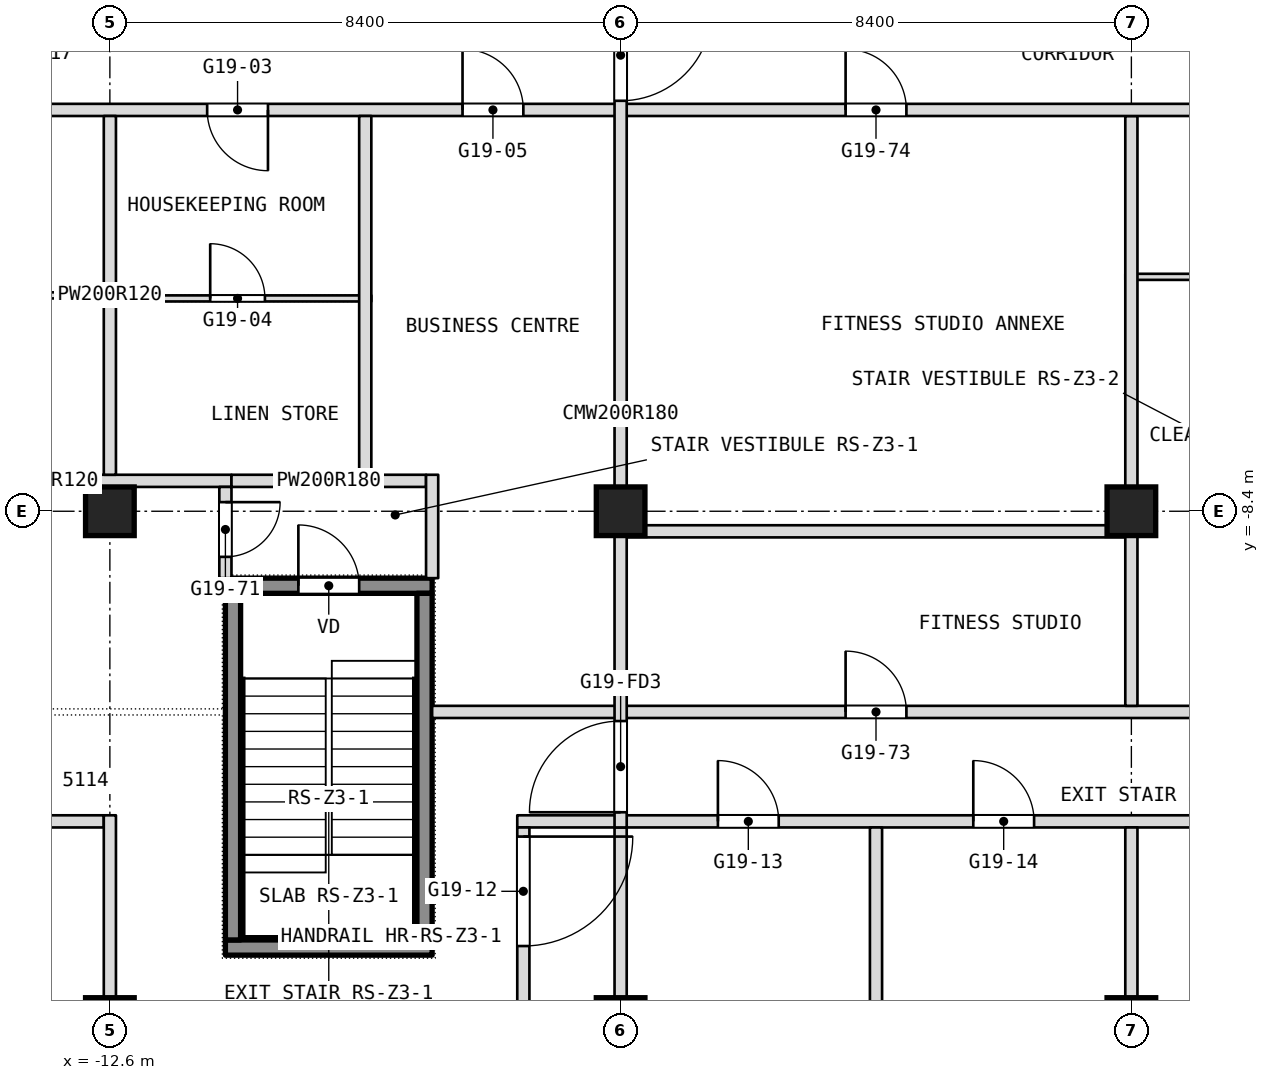
"""IFC4 building model, lengths in metres.
Left out: names, types, materials, properties, quantities, classifications, styles, units other than length and angle.
Written with IfcOpenShell. Run it as: python <this file> out.ifc"""

import sys

from ifc_helpers import new_model, si_unit, direction, frame, frame_2d, origin, origin_2d, place, context, subcontext, project, spatial, rectangle, extrude, element, fill, save


model = new_model("IFC4")
c1 = context("Model", 3, precision=1e-05, world=origin(), true_north=direction((0.0, 1.0)))
c2 = subcontext(c1, "Body", "Model", "MODEL_VIEW")
j1 = project(units=[si_unit("LENGTHUNIT", "METRE"), si_unit("PLANEANGLEUNIT", "RADIAN")], contexts=[c1])
p1 = place(None, origin())
s1 = spatial("IfcSite", under=j1, at=p1, CompositionType="ELEMENT")
p2 = place(p1, origin())
s2 = spatial("IfcBuilding", under=s1, at=p2, CompositionType="ELEMENT")
p3 = place(p2, frame((0.0, 0.0, 220.1)))
s3 = spatial("IfcBuildingStorey", under=s2, at=p3, CompositionType="ELEMENT", Elevation=220.1)
for number, where, z_axis, x_axis in (
    (1, (-12.6, -16.8, 0.0), (0.0, 0.0, 1.0), (1.0, 0.0, 0.0)),
    (2, (-12.6, -8.4, 0.0), (0.0, 0.0, 1.0), (1.0, 0.0, 0.0)),
    (3, (-4.2, -16.8, 0.0), (0.0, 0.0, 1.0), (1.0, 0.0, 0.0)),
    (4, (-4.2, -8.4, 0.0), (0.0, 0.0, 1.0), (1.0, 0.0, 0.0)),
    (5, (4.2, -16.8, 0.0), (0.0, 0.0, 1.0), (1.0, 0.0, 0.0)),
    (6, (4.2, -8.4, 0.0), (0.0, 0.0, 1.0), (1.0, 0.0, 0.0)),
):
    element("IfcColumn", number, at=place(p3, frame(where, z_axis=z_axis, x_axis=x_axis)), inside=s3, PredefinedType="COLUMN", context=c2, shape_type="SweptSolid", body=[
        extrude(rectangle(XDim=0.8, YDim=0.8, at=origin_2d()), origin(), (0.0, 0.0, 1.0), 3.6),
    ])
p4 = place(p3, frame((-16.7, -13.5, 0.0), z_axis=(0.0, 0.0, 1.0), x_axis=(1.0, 0.0, 0.0)))
e7 = element("IfcWall", 7, at=p4, inside=s3, PredefinedType="PARTITIONING", context=c2, shape_type="SweptSolid", body=[
    extrude(rectangle(XDim=4.0, YDim=0.2, at=frame_2d((2.0, 0.0))), origin(), (0.0, 0.0, 1.0), 3.34),
])
p5 = place(p4, frame((1.5, 0.0, 0.0)))
e8 = element("IfcOpeningElement", 8, at=p5, cuts=e7, PredefinedType="OPENING", context=c2, shape_type="SweptSolid", body=[
    extrude(rectangle(XDim=1.0, YDim=2.1, at=frame_2d((0.5, 1.05))), frame((0.0, 0.1, 0.0), z_axis=(0.0, -1.0, 0.0), x_axis=(1.0, 0.0, 0.0)), (0.0, 0.0, 1.0), 0.2),
])
p6 = place(p3, frame((-5.9, -13.5, 0.0), z_axis=(0.0, 0.0, 1.0), x_axis=(1.0, 0.0, 0.0)))
e9 = element("IfcWall", 9, at=p6, inside=s3, PredefinedType="PARTITIONING", context=c2, shape_type="SweptSolid", body=[
    extrude(rectangle(XDim=11.6, YDim=0.2, at=frame_2d((5.8, 0.0))), origin(), (0.0, 0.0, 1.0), 3.34),
])
p7 = place(p6, frame((3.3, 0.0, 0.0)))
e10 = element("IfcOpeningElement", 10, at=p7, cuts=e9, PredefinedType="OPENING", context=c2, shape_type="SweptSolid", body=[
    extrude(rectangle(XDim=1.0, YDim=2.1, at=frame_2d((0.5, 1.05))), frame((0.0, 0.1, 0.0), z_axis=(0.0, -1.0, 0.0), x_axis=(1.0, 0.0, 0.0)), (0.0, 0.0, 1.0), 0.2),
])
p8 = place(p6, frame((7.5, 0.0, 0.0)))
e11 = element("IfcOpeningElement", 11, at=p8, cuts=e9, PredefinedType="OPENING", context=c2, shape_type="SweptSolid", body=[
    extrude(rectangle(XDim=1.0, YDim=2.1, at=frame_2d((0.5, 1.05))), frame((0.0, 0.1, 0.0), z_axis=(0.0, -1.0, 0.0), x_axis=(1.0, 0.0, 0.0)), (0.0, 0.0, 1.0), 0.2),
])
p9 = place(p3, frame((-7.3, -11.7, 0.0), z_axis=(0.0, 0.0, 1.0), x_axis=(1.0, 0.0, 0.0)))
e12 = element("IfcWall", 12, at=p9, inside=s3, PredefinedType="PARTITIONING", context=c2, shape_type="SweptSolid", body=[
    extrude(rectangle(XDim=14.6, YDim=0.2, at=frame_2d((7.3, 0.0))), origin(), (0.0, 0.0, 1.0), 3.34),
])
p10 = place(p9, frame((6.8, 0.0, 0.0)))
e13 = element("IfcOpeningElement", 13, at=p10, cuts=e12, PredefinedType="OPENING", context=c2, shape_type="SweptSolid", body=[
    extrude(rectangle(XDim=1.0, YDim=2.1, at=frame_2d((0.5, 1.05))), frame((0.0, 0.1, 0.0), z_axis=(0.0, -1.0, 0.0), x_axis=(1.0, 0.0, 0.0)), (0.0, 0.0, 1.0), 0.2),
])
p11 = place(p3, frame((-4.1, -8.73, 0.0), z_axis=(0.0, 0.0, 1.0), x_axis=(1.0, 0.0, 0.0)))
e14 = element("IfcWall", 14, at=p11, inside=s3, PredefinedType="PARTITIONING", context=c2, shape_type="SweptSolid", body=[
    extrude(rectangle(XDim=8.2, YDim=0.2, at=frame_2d((4.1, 0.0))), origin(), (0.0, 0.0, 1.0), 3.34),
])
p12 = place(p3, frame((-16.7, -7.9, 0.0), z_axis=(0.0, 0.0, 1.0), x_axis=(1.0, 0.0, 0.0)))
e15 = element("IfcWall", 15, at=p12, inside=s3, PredefinedType="PARTITIONING", context=c2, shape_type="SweptSolid", body=[
    extrude(rectangle(XDim=6.1, YDim=0.2, at=frame_2d((3.05, 0.0))), origin(), (0.0, 0.0, 1.0), 3.34),
])
p13 = place(p3, frame((-10.6, -7.9, 0.0), z_axis=(0.0, 0.0, 1.0), x_axis=(1.0, 0.0, 0.0)))
e16 = element("IfcWall", 16, at=p13, inside=s3, PredefinedType="PARTITIONING", context=c2, shape_type="SweptSolid", body=[
    extrude(rectangle(XDim=3.2, YDim=0.2, at=frame_2d((1.6, 0.0))), origin(), (0.0, 0.0, 1.0), 3.34),
])
p14 = place(p3, frame((-12.5, -4.9, 0.0), z_axis=(0.0, 0.0, 1.0), x_axis=(1.0, 0.0, 0.0)))
e17 = element("IfcWall", 17, at=p14, inside=s3, PredefinedType="PARTITIONING", context=c2, shape_type="SweptSolid", body=[
    extrude(rectangle(XDim=4.2, YDim=0.1, at=frame_2d((2.1, 0.0))), origin(), (0.0, 0.0, 1.0), 3.34),
])
p15 = place(p14, frame((1.55, 0.0, 0.0)))
e18 = element("IfcOpeningElement", 18, at=p15, cuts=e17, PredefinedType="OPENING", context=c2, shape_type="SweptSolid", body=[
    extrude(rectangle(XDim=0.9, YDim=2.1, at=frame_2d((0.45, 1.05))), frame((0.0, 0.05, 0.0), z_axis=(0.0, -1.0, 0.0), x_axis=(1.0, 0.0, 0.0)), (0.0, 0.0, 1.0), 0.1),
])
p16 = place(p3, frame((-16.7, -4.85, 0.0), z_axis=(0.0, 0.0, 1.0), x_axis=(1.0, 0.0, 0.0)))
e19 = element("IfcWall", 19, at=p16, inside=s3, PredefinedType="PARTITIONING", context=c2, shape_type="SweptSolid", body=[
    extrude(rectangle(XDim=4.2, YDim=0.1, at=frame_2d((2.1, 0.0))), origin(), (0.0, 0.0, 1.0), 3.34),
])
p17 = place(p16, frame((1.55, 0.0, 0.0)))
e20 = element("IfcOpeningElement", 20, at=p17, cuts=e19, PredefinedType="OPENING", context=c2, shape_type="SweptSolid", body=[
    extrude(rectangle(XDim=0.9, YDim=2.1, at=frame_2d((0.45, 1.05))), frame((0.0, 0.05, 0.0), z_axis=(0.0, -1.0, 0.0), x_axis=(1.0, 0.0, 0.0)), (0.0, 0.0, 1.0), 0.1),
])
p18 = place(p3, frame((4.1, -4.545, 0.0), z_axis=(0.0, 0.0, 1.0), x_axis=(1.0, 0.0, 0.0)))
e21 = element("IfcWall", 21, at=p18, inside=s3, PredefinedType="PARTITIONING", context=c2, shape_type="SweptSolid", body=[
    extrude(rectangle(XDim=4.4, YDim=0.1, at=frame_2d((2.2, 0.0))), origin(), (0.0, 0.0, 1.0), 3.34),
])
p19 = place(p18, frame((1.75, 0.0, 0.0)))
e22 = element("IfcOpeningElement", 22, at=p19, cuts=e21, PredefinedType="OPENING", context=c2, shape_type="SweptSolid", body=[
    extrude(rectangle(XDim=0.9, YDim=2.1, at=frame_2d((0.45, 1.05))), frame((0.0, 0.05, 0.0), z_axis=(0.0, -1.0, 0.0), x_axis=(1.0, 0.0, 0.0)), (0.0, 0.0, 1.0), 0.1),
])
p20 = place(p3, frame((4.2, -20.0, 0.0), z_axis=(0.0, 0.0, 1.0), x_axis=(0.0, 1.0, 0.0)))
e23 = element("IfcWall", 23, at=p20, inside=s3, PredefinedType="PARTITIONING", context=c2, shape_type="SweptSolid", body=[
    extrude(rectangle(XDim=6.4, YDim=0.2, at=frame_2d((3.2, 0.0))), origin(), (0.0, 0.0, 1.0), 3.34),
])
p21 = place(p3, frame((4.2, -11.6, 0.0), z_axis=(0.0, 0.0, 1.0), x_axis=(0.0, 1.0, 0.0)))
e24 = element("IfcWall", 24, at=p21, inside=s3, PredefinedType="PARTITIONING", context=c2, shape_type="SweptSolid", body=[
    extrude(rectangle(XDim=9.7, YDim=0.2, at=frame_2d((4.85, 0.0))), origin(), (0.0, 0.0, 1.0), 3.34),
])
p22 = place(p3, frame((-16.9, -1.8, 0.0), z_axis=(0.0, 0.0, 1.0), x_axis=(1.0, 0.0, 0.0)))
e25 = element("IfcWall", 25, at=p22, inside=s3, PredefinedType="PARTITIONING", context=c2, shape_type="SweptSolid", body=[
    extrude(rectangle(XDim=33.8, YDim=0.2, at=frame_2d((16.9, 0.0))), origin(), (0.0, 0.0, 1.0), 3.34),
])
p23 = place(p22, frame((1.7, 0.0, 0.0)))
e26 = element("IfcOpeningElement", 26, at=p23, cuts=e25, PredefinedType="OPENING", context=c2, shape_type="SweptSolid", body=[
    extrude(rectangle(XDim=1.0, YDim=2.1, at=frame_2d((0.5, 1.05))), frame((0.0, 0.1, 0.0), z_axis=(0.0, -1.0, 0.0), x_axis=(1.0, 0.0, 0.0)), (0.0, 0.0, 1.0), 0.2),
])
p24 = place(p22, frame((5.9, 0.0, 0.0)))
e27 = element("IfcOpeningElement", 27, at=p24, cuts=e25, PredefinedType="OPENING", context=c2, shape_type="SweptSolid", body=[
    extrude(rectangle(XDim=1.0, YDim=2.1, at=frame_2d((0.5, 1.05))), frame((0.0, 0.1, 0.0), z_axis=(0.0, -1.0, 0.0), x_axis=(1.0, 0.0, 0.0)), (0.0, 0.0, 1.0), 0.2),
])
p25 = place(p22, frame((10.1, 0.0, 0.0)))
e28 = element("IfcOpeningElement", 28, at=p25, cuts=e25, PredefinedType="OPENING", context=c2, shape_type="SweptSolid", body=[
    extrude(rectangle(XDim=1.0, YDim=2.1, at=frame_2d((0.5, 1.05))), frame((0.0, 0.1, 0.0), z_axis=(0.0, -1.0, 0.0), x_axis=(1.0, 0.0, 0.0)), (0.0, 0.0, 1.0), 0.2),
])
p26 = place(p22, frame((22.7, 0.0, 0.0)))
e29 = element("IfcOpeningElement", 29, at=p26, cuts=e25, PredefinedType="OPENING", context=c2, shape_type="SweptSolid", body=[
    extrude(rectangle(XDim=1.0, YDim=2.1, at=frame_2d((0.5, 1.05))), frame((0.0, 0.1, 0.0), z_axis=(0.0, -1.0, 0.0), x_axis=(1.0, 0.0, 0.0)), (0.0, 0.0, 1.0), 0.2),
])
p27 = place(p22, frame((26.9, 0.0, 0.0)))
e30 = element("IfcOpeningElement", 30, at=p27, cuts=e25, PredefinedType="OPENING", context=c2, shape_type="SweptSolid", body=[
    extrude(rectangle(XDim=1.0, YDim=2.1, at=frame_2d((0.5, 1.05))), frame((0.0, 0.1, 0.0), z_axis=(0.0, -1.0, 0.0), x_axis=(1.0, 0.0, 0.0)), (0.0, 0.0, 1.0), 0.2),
])
p28 = place(p22, frame((31.1, 0.0, 0.0)))
e31 = element("IfcOpeningElement", 31, at=p28, cuts=e25, PredefinedType="OPENING", context=c2, shape_type="SweptSolid", body=[
    extrude(rectangle(XDim=1.0, YDim=2.1, at=frame_2d((0.5, 1.05))), frame((0.0, 0.1, 0.0), z_axis=(0.0, -1.0, 0.0), x_axis=(1.0, 0.0, 0.0)), (0.0, 0.0, 1.0), 0.2),
])
p29 = place(p22, frame((16.4, 0.0, 0.0)))
e32 = element("IfcOpeningElement", 32, at=p29, cuts=e25, PredefinedType="OPENING", context=c2, shape_type="SweptSolid", body=[
    extrude(rectangle(XDim=1.0, YDim=2.1, at=frame_2d((0.5, 1.05))), frame((0.0, 0.1, 0.0), z_axis=(0.0, -1.0, 0.0), x_axis=(1.0, 0.0, 0.0)), (0.0, 0.0, 1.0), 0.2),
])
p30 = place(p3, frame((0.0, -20.0, 0.0), z_axis=(0.0, 0.0, 1.0), x_axis=(0.0, 1.0, 0.0)))
e33 = element("IfcWall", 33, at=p30, inside=s3, PredefinedType="PARTITIONING", context=c2, shape_type="SweptSolid", body=[
    extrude(rectangle(XDim=6.4, YDim=0.2, at=frame_2d((3.2, 0.0))), origin(), (0.0, 0.0, 1.0), 3.34),
])
p31 = place(p3, frame((-4.2, -22.0, 0.0), z_axis=(0.0, 0.0, 1.0), x_axis=(0.0, 1.0, 0.0)))
e34 = element("IfcWall", 34, at=p31, inside=s3, PredefinedType="PARTITIONING", context=c2, shape_type="SweptSolid", body=[
    extrude(rectangle(XDim=8.4, YDim=0.2, at=frame_2d((4.2, 0.0))), origin(), (0.0, 0.0, 1.0), 3.34),
])
p32 = place(p31, frame((0.25, 0.0, 0.0)))
e35 = element("IfcOpeningElement", 35, at=p32, cuts=e34, PredefinedType="OPENING", context=c2, shape_type="SweptSolid", body=[
    extrude(rectangle(XDim=1.5, YDim=2.1, at=frame_2d((0.75, 1.05))), frame((0.0, 0.1, 0.0), z_axis=(0.0, -1.0, 0.0), x_axis=(1.0, 0.0, 0.0)), (0.0, 0.0, 1.0), 0.2),
])
p33 = place(p3, frame((-4.2, -13.6, 0.0), z_axis=(0.0, 0.0, 1.0), x_axis=(0.0, 1.0, 0.0)))
e36 = element("IfcWall", 36, at=p33, inside=s3, PredefinedType="PARTITIONING", context=c2, shape_type="SweptSolid", body=[
    extrude(rectangle(XDim=13.6, YDim=0.2, at=frame_2d((6.8, 0.0))), origin(), (0.0, 0.0, 1.0), 3.34),
])
p34 = place(p33, frame((11.95, 0.0, 0.0)))
e37 = element("IfcOpeningElement", 37, at=p34, cuts=e36, PredefinedType="OPENING", context=c2, shape_type="SweptSolid", body=[
    extrude(rectangle(XDim=1.5, YDim=2.1, at=frame_2d((0.75, 1.05))), frame((0.0, 0.1, 0.0), z_axis=(0.0, -1.0, 0.0), x_axis=(1.0, 0.0, 0.0)), (0.0, 0.0, 1.0), 0.2),
])
p35 = place(p33, frame((0.25, 0.0, 0.0)))
e38 = element("IfcOpeningElement", 38, at=p35, cuts=e36, PredefinedType="OPENING", context=c2, shape_type="SweptSolid", body=[
    extrude(rectangle(XDim=1.5, YDim=2.1, at=frame_2d((0.75, 1.05))), frame((0.0, 0.1, 0.0), z_axis=(0.0, -1.0, 0.0), x_axis=(1.0, 0.0, 0.0)), (0.0, 0.0, 1.0), 0.2),
])
p36 = place(p3, frame((-5.8, -18.5, 0.0), z_axis=(0.0, 0.0, 1.0), x_axis=(0.0, 1.0, 0.0)))
e39 = element("IfcWall", 39, at=p36, inside=s3, PredefinedType="PARTITIONING", context=c2, shape_type="SweptSolid", body=[
    extrude(rectangle(XDim=4.9, YDim=0.2, at=frame_2d((2.45, 0.0))), origin(), (0.0, 0.0, 1.0), 3.34),
])
p37 = place(p36, frame((2.95, 0.0, 0.0)))
e40 = element("IfcOpeningElement", 40, at=p37, cuts=e39, PredefinedType="OPENING", context=c2, shape_type="SweptSolid", body=[
    extrude(rectangle(XDim=1.8, YDim=2.1, at=frame_2d((0.9, 1.05))), frame((0.0, 0.1, 0.0), z_axis=(0.0, -1.0, 0.0), x_axis=(1.0, 0.0, 0.0)), (0.0, 0.0, 1.0), 0.2),
])
p38 = place(p3, frame((-7.3, -9.5, 0.0), z_axis=(0.0, 0.0, 1.0), x_axis=(0.0, 1.0, 0.0)))
e41 = element("IfcWall", 41, at=p38, inside=s3, PredefinedType="PARTITIONING", context=c2, shape_type="SweptSolid", body=[
    extrude(rectangle(XDim=1.7, YDim=0.2, at=frame_2d((0.85, 0.0))), origin(), (0.0, 0.0, 1.0), 3.34),
])
p39 = place(p3, frame((-8.4, -8.0, 0.0), z_axis=(0.0, 0.0, 1.0), x_axis=(0.0, 1.0, 0.0)))
e42 = element("IfcWall", 42, at=p39, inside=s3, PredefinedType="PARTITIONING", context=c2, shape_type="SweptSolid", body=[
    extrude(rectangle(XDim=6.1, YDim=0.2, at=frame_2d((3.05, 0.0))), origin(), (0.0, 0.0, 1.0), 3.34),
])
p40 = place(p3, frame((-10.7, -9.5, 0.0), z_axis=(0.0, 0.0, 1.0), x_axis=(0.0, 1.0, 0.0)))
e43 = element("IfcWall", 43, at=p40, inside=s3, PredefinedType="PARTITIONING", context=c2, shape_type="SweptSolid", body=[
    extrude(rectangle(XDim=1.5, YDim=0.2, at=frame_2d((0.75, 0.0))), origin(), (0.0, 0.0, 1.0), 3.34),
])
p41 = place(p40, frame((0.35, 0.0, 0.0)))
e44 = element("IfcOpeningElement", 44, at=p41, cuts=e43, PredefinedType="OPENING", context=c2, shape_type="SweptSolid", body=[
    extrude(rectangle(XDim=0.9, YDim=2.1, at=frame_2d((0.45, 1.05))), frame((0.0, 0.1, 0.0), z_axis=(0.0, -1.0, 0.0), x_axis=(1.0, 0.0, 0.0)), (0.0, 0.0, 1.0), 0.2),
])
p42 = place(p3, frame((-12.6, -7.8, 0.0), z_axis=(0.0, 0.0, 1.0), x_axis=(0.0, 1.0, 0.0)))
e45 = element("IfcWall", 45, at=p42, inside=s3, PredefinedType="PARTITIONING", context=c2, shape_type="SweptSolid", body=[
    extrude(rectangle(XDim=5.9, YDim=0.2, at=frame_2d((2.95, 0.0))), origin(), (0.0, 0.0, 1.0), 3.34),
])
p43 = place(p3, frame((-12.6, -18.5, 0.0), z_axis=(0.0, 0.0, 1.0), x_axis=(0.0, 1.0, 0.0)))
e46 = element("IfcWall", 46, at=p43, inside=s3, PredefinedType="PARTITIONING", context=c2, shape_type="SweptSolid", body=[
    extrude(rectangle(XDim=5.1, YDim=0.2, at=frame_2d((2.55, 0.0))), origin(), (0.0, 0.0, 1.0), 3.34),
])
p44 = place(p3, frame((-10.7, -15.575, 0.1), z_axis=(0.0, 0.0, 1.0), x_axis=(1.0, 0.0, 0.0)))
e47 = element("IfcWall", 47, at=p44, inside=s3, PredefinedType="SHEAR", context=c2, shape_type="SweptSolid", body=[
    extrude(rectangle(XDim=3.4, YDim=0.25, at=frame_2d((1.7, 0.0))), origin(), (0.0, 0.0, 1.0), 3.6),
])
p45 = place(p3, frame((-10.7, -9.625, 0.1), z_axis=(0.0, 0.0, 1.0), x_axis=(1.0, 0.0, 0.0)))
e48 = element("IfcWall", 48, at=p45, inside=s3, PredefinedType="SHEAR", context=c2, shape_type="SweptSolid", body=[
    extrude(rectangle(XDim=3.4, YDim=0.25, at=frame_2d((1.7, 0.0))), origin(), (0.0, 0.0, 1.0), 3.6),
])
p46 = place(p45, frame((1.2, 0.0, 0.0)))
e49 = element("IfcOpeningElement", 49, at=p46, cuts=e48, PredefinedType="OPENING", context=c2, shape_type="SweptSolid", body=[
    extrude(rectangle(XDim=1.0, YDim=2.1, at=frame_2d((0.5, 1.05))), frame((0.0, 0.125, 0.0), z_axis=(0.0, -1.0, 0.0), x_axis=(1.0, 0.0, 0.0)), (0.0, 0.0, 1.0), 0.25),
])
for number, where, z_axis, x_axis in (
    (50, (-10.575, -15.45, 0.1), (0.0, 0.0, 1.0), (0.0, 1.0, 0.0)),
    (51, (-7.425, -15.45, 0.1), (0.0, 0.0, 1.0), (0.0, 1.0, 0.0)),
):
    element("IfcWall", number, at=place(p3, frame(where, z_axis=z_axis, x_axis=x_axis)), inside=s3, PredefinedType="SHEAR", context=c2, shape_type="SweptSolid", body=[
        extrude(rectangle(XDim=5.7, YDim=0.25, at=frame_2d((2.85, 0.0))), origin(), (0.0, 0.0, 1.0), 3.6),
    ])
p47 = place(p7, origin())
e52 = element("IfcDoor", 52, at=p47, inside=s3, OperationType="SINGLE_SWING_LEFT", PredefinedType="DOOR", context=c2, shape_type="SweptSolid", body=[
    extrude(rectangle(XDim=1.0, YDim=2.1, at=frame_2d((0.5, 1.05))), frame((0.0, 0.025, 0.0), z_axis=(0.0, -1.0, 0.0), x_axis=(1.0, 0.0, 0.0)), (0.0, 0.0, 1.0), 0.05),
])
fill(e10, e52)
p48 = place(p8, origin())
e53 = element("IfcDoor", 53, at=p48, inside=s3, OperationType="SINGLE_SWING_RIGHT", PredefinedType="DOOR", context=c2, shape_type="SweptSolid", body=[
    extrude(rectangle(XDim=1.0, YDim=2.1, at=frame_2d((0.5, 1.05))), frame((0.0, 0.025, 0.0), z_axis=(0.0, -1.0, 0.0), x_axis=(1.0, 0.0, 0.0)), (0.0, 0.0, 1.0), 0.05),
])
fill(e11, e53)
p49 = place(p10, origin())
e54 = element("IfcDoor", 54, at=p49, inside=s3, OperationType="SINGLE_SWING_LEFT", PredefinedType="DOOR", context=c2, shape_type="SweptSolid", body=[
    extrude(rectangle(XDim=1.0, YDim=2.1, at=frame_2d((0.5, 1.05))), frame((0.0, 0.025, 0.0), z_axis=(0.0, -1.0, 0.0), x_axis=(1.0, 0.0, 0.0)), (0.0, 0.0, 1.0), 0.05),
])
fill(e13, e54)
p50 = place(p15, origin())
e55 = element("IfcDoor", 55, at=p50, inside=s3, OperationType="SINGLE_SWING_RIGHT", PredefinedType="DOOR", context=c2, shape_type="SweptSolid", body=[
    extrude(rectangle(XDim=0.9, YDim=2.1, at=frame_2d((0.45, 1.05))), frame((0.0, 0.025, 0.0), z_axis=(0.0, -1.0, 0.0), x_axis=(1.0, 0.0, 0.0)), (0.0, 0.0, 1.0), 0.05),
])
fill(e18, e55)
p51 = place(p24, origin())
e56 = element("IfcDoor", 56, at=p51, inside=s3, OperationType="SINGLE_SWING_LEFT", PredefinedType="DOOR", context=c2, shape_type="SweptSolid", body=[
    extrude(rectangle(XDim=1.0, YDim=2.1, at=frame_2d((0.5, 1.05))), frame((0.0, 0.025, 0.0), z_axis=(0.0, -1.0, 0.0), x_axis=(1.0, 0.0, 0.0)), (0.0, 0.0, 1.0), 0.05),
])
fill(e27, e56)
p52 = place(p25, origin())
e57 = element("IfcDoor", 57, at=p52, inside=s3, OperationType="SINGLE_SWING_RIGHT", PredefinedType="DOOR", context=c2, shape_type="SweptSolid", body=[
    extrude(rectangle(XDim=1.0, YDim=2.1, at=frame_2d((0.5, 1.05))), frame((0.0, 0.025, 0.0), z_axis=(0.0, -1.0, 0.0), x_axis=(1.0, 0.0, 0.0)), (0.0, 0.0, 1.0), 0.05),
])
fill(e28, e57)
p53 = place(p29, origin())
e58 = element("IfcDoor", 58, at=p53, inside=s3, OperationType="SINGLE_SWING_LEFT", PredefinedType="DOOR", context=c2, shape_type="SweptSolid", body=[
    extrude(rectangle(XDim=1.0, YDim=2.1, at=frame_2d((0.5, 1.05))), frame((0.0, 0.025, 0.0), z_axis=(0.0, -1.0, 0.0), x_axis=(1.0, 0.0, 0.0)), (0.0, 0.0, 1.0), 0.05),
])
fill(e32, e58)
p54 = place(p37, origin())
e59 = element("IfcDoor", 59, at=p54, inside=s3, OperationType="DOUBLE_DOOR_SINGLE_SWING", PredefinedType="DOOR", context=c2, shape_type="SweptSolid", body=[
    extrude(rectangle(XDim=1.8, YDim=2.1, at=frame_2d((0.9, 1.05))), frame((0.0, 0.025, 0.0), z_axis=(0.0, -1.0, 0.0), x_axis=(1.0, 0.0, 0.0)), (0.0, 0.0, 1.0), 0.05),
])
fill(e40, e59)
p55 = place(p41, origin())
e60 = element("IfcDoor", 60, at=p55, inside=s3, OperationType="SINGLE_SWING_LEFT", PredefinedType="DOOR", context=c2, shape_type="SweptSolid", body=[
    extrude(rectangle(XDim=0.9, YDim=2.1, at=frame_2d((0.45, 1.05))), frame((0.0, 0.025, 0.0), z_axis=(0.0, -1.0, 0.0), x_axis=(1.0, 0.0, 0.0)), (0.0, 0.0, 1.0), 0.05),
])
fill(e44, e60)
p56 = place(p46, origin())
e61 = element("IfcDoor", 61, at=p56, inside=s3, OperationType="SINGLE_SWING_LEFT", PredefinedType="DOOR", context=c2, shape_type="SweptSolid", body=[
    extrude(rectangle(XDim=1.0, YDim=2.1, at=frame_2d((0.5, 1.05))), frame((0.0, 0.025, 0.0), z_axis=(0.0, -1.0, 0.0), x_axis=(1.0, 0.0, 0.0)), (0.0, 0.0, 1.0), 0.05),
])
fill(e49, e61)
p57 = place(p34, origin())
e62 = element("IfcDoor", 62, at=p57, inside=s3, OperationType="DOUBLE_DOOR_DOUBLE_SWING", PredefinedType="DOOR", context=c2, shape_type="SweptSolid", body=[
    extrude(rectangle(XDim=1.5, YDim=2.1, at=frame_2d((0.75, 1.05))), frame((0.0, 0.025, 0.0), z_axis=(0.0, -1.0, 0.0), x_axis=(1.0, 0.0, 0.0)), (0.0, 0.0, 1.0), 0.05),
])
fill(e37, e62)
p58 = place(p35, origin())
e63 = element("IfcDoor", 63, at=p58, inside=s3, OperationType="DOUBLE_DOOR_DOUBLE_SWING", PredefinedType="DOOR", context=c2, shape_type="SweptSolid", body=[
    extrude(rectangle(XDim=1.5, YDim=2.1, at=frame_2d((0.75, 1.05))), frame((0.0, 0.025, 0.0), z_axis=(0.0, -1.0, 0.0), x_axis=(1.0, 0.0, 0.0)), (0.0, 0.0, 1.0), 0.05),
])
fill(e38, e63)
save(model, sys.argv[1])
